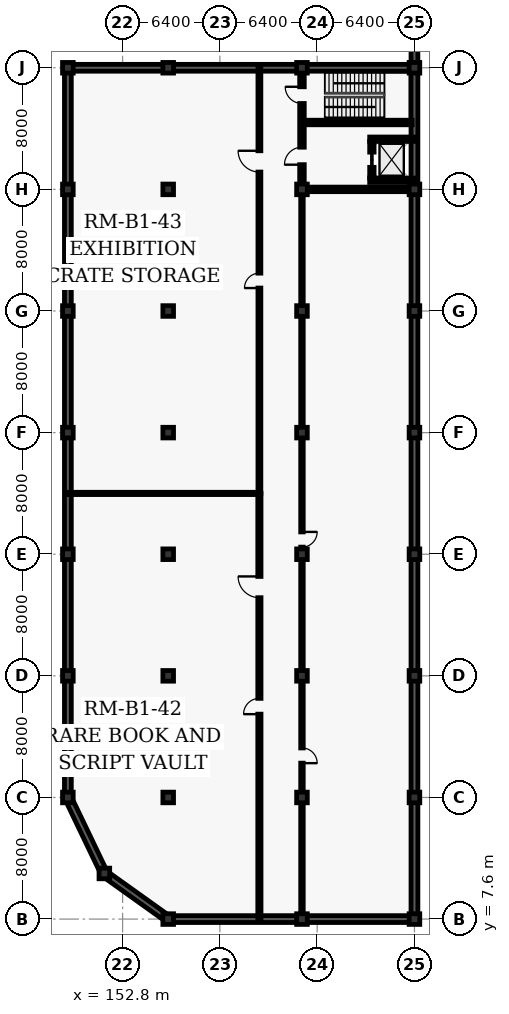
"""IFC4 building model, lengths in metres.
Left out: names, types, materials, properties, quantities, classifications, styles, units other than length and angle.
Written with IfcOpenShell. Run it as: python <this file> out.ifc"""

import sys

from ifc_helpers import new_model, si_unit, direction, frame, frame_2d, origin, origin_2d, place, context, subcontext, project, spatial, rectangle, extrude, element, fill, save


model = new_model("IFC4")
c1 = context("Model", 3, precision=1e-05, world=origin(), true_north=direction((0.0, 1.0)))
c2 = subcontext(c1, "Body", "Model", "MODEL_VIEW")
j1 = project(units=[si_unit("LENGTHUNIT", "METRE"), si_unit("PLANEANGLEUNIT", "RADIAN")], contexts=[c1])
p1 = place(None, origin())
s1 = spatial("IfcSite", under=j1, at=p1, CompositionType="ELEMENT")
p2 = place(p1, origin())
s2 = spatial("IfcBuilding", under=s1, at=p2, CompositionType="ELEMENT")
p3 = place(p2, frame((0.0, 0.0, -4.8)))
s3 = spatial("IfcBuildingStorey", under=s2, at=p3, CompositionType="ELEMENT", Elevation=-4.8)
for number, where, z_axis, x_axis in (
    (1, (149.2, 15.6, 0.0), (0.0, 0.0, 1.0), (1.0, 0.0, 0.0)),
    (2, (149.2, 23.6, 0.0), (0.0, 0.0, 1.0), (1.0, 0.0, 0.0)),
    (3, (149.2, 31.6, 0.0), (0.0, 0.0, 1.0), (1.0, 0.0, 0.0)),
    (4, (149.2, 39.6, 0.0), (0.0, 0.0, 1.0), (1.0, 0.0, 0.0)),
    (5, (149.2, 47.6, 0.0), (0.0, 0.0, 1.0), (1.0, 0.0, 0.0)),
    (6, (149.2, 55.6, 0.0), (0.0, 0.0, 1.0), (1.0, 0.0, 0.0)),
    (7, (149.2, 63.6, 0.0), (0.0, 0.0, 1.0), (1.0, 0.0, 0.0)),
    (8, (151.6, 10.6, 0.0), (0.0, 0.0, 1.0), (1.0, 0.0, 0.0)),
    (9, (155.8, 7.6, 0.0), (0.0, 0.0, 1.0), (1.0, 0.0, 0.0)),
    (10, (155.8, 15.6, 0.0), (0.0, 0.0, 1.0), (1.0, 0.0, 0.0)),
    (11, (155.8, 23.6, 0.0), (0.0, 0.0, 1.0), (1.0, 0.0, 0.0)),
    (12, (155.8, 31.6, 0.0), (0.0, 0.0, 1.0), (1.0, 0.0, 0.0)),
    (13, (155.8, 39.6, 0.0), (0.0, 0.0, 1.0), (1.0, 0.0, 0.0)),
    (14, (155.8, 47.6, 0.0), (0.0, 0.0, 1.0), (1.0, 0.0, 0.0)),
    (15, (155.8, 55.6, 0.0), (0.0, 0.0, 1.0), (1.0, 0.0, 0.0)),
    (16, (155.8, 63.6, 0.0), (0.0, 0.0, 1.0), (1.0, 0.0, 0.0)),
    (17, (164.6, 7.6, 0.0), (0.0, 0.0, 1.0), (1.0, 0.0, 0.0)),
    (18, (164.6, 15.6, 0.0), (0.0, 0.0, 1.0), (1.0, 0.0, 0.0)),
    (19, (164.6, 23.6, 0.0), (0.0, 0.0, 1.0), (1.0, 0.0, 0.0)),
    (20, (164.6, 31.6, 0.0), (0.0, 0.0, 1.0), (1.0, 0.0, 0.0)),
    (21, (164.6, 39.6, 0.0), (0.0, 0.0, 1.0), (1.0, 0.0, 0.0)),
    (22, (164.6, 47.6, 0.0), (0.0, 0.0, 1.0), (1.0, 0.0, 0.0)),
    (23, (164.6, 55.6, 0.0), (0.0, 0.0, 1.0), (1.0, 0.0, 0.0)),
    (24, (164.6, 63.6, 0.0), (0.0, 0.0, 1.0), (1.0, 0.0, 0.0)),
    (25, (172.0, 7.6, 0.0), (0.0, 0.0, 1.0), (1.0, 0.0, 0.0)),
    (26, (172.0, 15.6, 0.0), (0.0, 0.0, 1.0), (1.0, 0.0, 0.0)),
    (27, (172.0, 23.6, 0.0), (0.0, 0.0, 1.0), (1.0, 0.0, 0.0)),
    (28, (172.0, 31.6, 0.0), (0.0, 0.0, 1.0), (1.0, 0.0, 0.0)),
    (29, (172.0, 39.6, 0.0), (0.0, 0.0, 1.0), (1.0, 0.0, 0.0)),
    (30, (172.0, 47.6, 0.0), (0.0, 0.0, 1.0), (1.0, 0.0, 0.0)),
    (31, (172.0, 55.6, 0.0), (0.0, 0.0, 1.0), (1.0, 0.0, 0.0)),
    (32, (172.0, 63.6, 0.0), (0.0, 0.0, 1.0), (1.0, 0.0, 0.0)),
):
    element("IfcColumn", number, at=place(p3, frame(where, z_axis=z_axis, x_axis=x_axis)), inside=s3, PredefinedType="COLUMN", context=c2, shape_type="SweptSolid", body=[
        extrude(rectangle(XDim=0.7, YDim=0.7, at=origin_2d()), origin(), (0.0, 0.0, 1.0), 4.8),
    ])
p4 = place(p3, frame((172.0, 63.62, 0.0), z_axis=(0.0, 0.0, 1.0), x_axis=(0.0, 1.0, 0.0)))
e33 = element("IfcWall", 33, at=p4, inside=s3, PredefinedType="USERDEFINED", context=c2, shape_type="SweptSolid", body=[
    extrude(rectangle(XDim=7.96, YDim=0.45, at=frame_2d((3.98, 0.0))), origin(), (0.0, 0.0, 1.0), 4.53),
])
p5 = place(p3, frame((151.6, 10.6, 0.0), z_axis=(0.0, 0.0, 1.0), x_axis=(-0.432752533251, 0.901512753634, 0.0)))
e34 = element("IfcWall", 34, at=p5, inside=s3, PredefinedType="USERDEFINED", context=c2, shape_type="SweptSolid", body=[
    extrude(rectangle(XDim=5.546, YDim=0.45, at=frame_2d((2.773, 0.0))), origin(), (0.0, 0.0, 1.0), 4.5),
])
p6 = place(p3, frame((149.2, 15.6, 0.0), z_axis=(0.0, 0.0, 1.0), x_axis=(0.0, 1.0, 0.0)))
e35 = element("IfcWall", 35, at=p6, inside=s3, PredefinedType="USERDEFINED", context=c2, shape_type="SweptSolid", body=[
    extrude(rectangle(XDim=48.0, YDim=0.45, at=frame_2d((24.0, 0.0))), origin(), (0.0, 0.0, 1.0), 3.65),
])
p7 = place(p3, frame((149.2, 63.6, 0.0), z_axis=(0.0, 0.0, 1.0), x_axis=(1.0, 0.0, 0.0)))
e36 = element("IfcWall", 36, at=p7, inside=s3, PredefinedType="USERDEFINED", context=c2, shape_type="SweptSolid", body=[
    extrude(rectangle(XDim=22.8, YDim=0.45, at=frame_2d((11.4, 0.0))), origin(), (0.0, 0.0, 1.0), 3.65),
])
p8 = place(p3, frame((172.0, 63.6, 0.0), z_axis=(0.0, 0.0, 1.0), x_axis=(0.0, -1.0, 0.0)))
e37 = element("IfcWall", 37, at=p8, inside=s3, PredefinedType="USERDEFINED", context=c2, shape_type="SweptSolid", body=[
    extrude(rectangle(XDim=56.0, YDim=0.45, at=frame_2d((28.0, 0.0))), origin(), (0.0, 0.0, 1.0), 3.65),
])
p9 = place(p3, frame((172.0, 7.6, 0.0), z_axis=(0.0, 0.0, 1.0), x_axis=(-1.0, 0.0, 0.0)))
e38 = element("IfcWall", 38, at=p9, inside=s3, PredefinedType="USERDEFINED", context=c2, shape_type="SweptSolid", body=[
    extrude(rectangle(XDim=16.2, YDim=0.45, at=frame_2d((8.1, 0.0))), origin(), (0.0, 0.0, 1.0), 3.65),
])
p10 = place(p3, frame((155.8, 7.6, 0.0), z_axis=(0.0, 0.0, 1.0), x_axis=(-0.813730275137, 0.581242668191, 0.0)))
e39 = element("IfcWall", 39, at=p10, inside=s3, PredefinedType="USERDEFINED", context=c2, shape_type="SweptSolid", body=[
    extrude(rectangle(XDim=5.161, YDim=0.45, at=frame_2d((2.581, 0.0))), origin(), (0.0, 0.0, 1.0), 4.5),
])
p11 = place(p3, frame((164.952, 55.6, 0.0), z_axis=(0.0, 0.0, 1.0), x_axis=(1.0, 0.0, 0.0)))
e40 = element("IfcWall", 40, at=p11, inside=s3, PredefinedType="SHEAR", context=c2, shape_type="SweptSolid", body=[
    extrude(rectangle(XDim=6.696, YDim=0.3, at=frame_2d((3.348, 0.0))), origin(), (0.0, 0.0, 1.0), 4.5),
])
p12 = place(p3, frame((164.6, 55.952, 0.0), z_axis=(0.0, 0.0, 1.0), x_axis=(0.0, 1.0, 0.0)))
e41 = element("IfcWall", 41, at=p12, inside=s3, PredefinedType="SHEAR", context=c2, shape_type="SweptSolid", body=[
    extrude(rectangle(XDim=7.296, YDim=0.3, at=frame_2d((3.648, 0.0))), origin(), (0.0, 0.0, 1.0), 4.5),
])
p13 = place(p12, frame((5.298, 0.0, 0.0)))
e42 = element("IfcOpeningElement", 42, at=p13, cuts=e41, PredefinedType="OPENING", context=c2, shape_type="SweptSolid", body=[
    extrude(rectangle(XDim=1.1, YDim=2.15, at=frame_2d((0.55, 1.075))), frame((0.0, 0.16, 0.0), z_axis=(0.0, -1.0, 0.0), x_axis=(1.0, 0.0, 0.0)), (0.0, 0.0, 1.0), 0.32),
])
p14 = place(p12, frame((1.273, 0.0, 0.0)))
e43 = element("IfcOpeningElement", 43, at=p14, cuts=e41, PredefinedType="OPENING", context=c2, shape_type="SweptSolid", body=[
    extrude(rectangle(XDim=1.15, YDim=2.2, at=frame_2d((0.575, 1.1))), frame((0.0, 0.16, 0.0), z_axis=(0.0, -1.0, 0.0), x_axis=(1.0, 0.0, 0.0)), (0.0, 0.0, 1.0), 0.32),
])
p15 = place(p3, frame((164.75, 60.0, 0.0), z_axis=(0.0, 0.0, 1.0), x_axis=(1.0, 0.0, 0.0)))
e44 = element("IfcWall", 44, at=p15, inside=s3, PredefinedType="SHEAR", context=c2, shape_type="SweptSolid", body=[
    extrude(rectangle(XDim=7.1, YDim=0.3, at=frame_2d((3.55, 0.0))), origin(), (0.0, 0.0, 1.0), 4.5),
])
for number, where, z_axis, x_axis in (
    (45, (169.055, 56.2, 0.0), (0.0, 0.0, 1.0), (1.0, 0.0, 0.0)),
    (46, (169.055, 58.9, 0.0), (0.0, 0.0, 1.0), (1.0, 0.0, 0.0)),
):
    element("IfcWall", number, at=place(p3, frame(where, z_axis=z_axis, x_axis=x_axis)), inside=s3, PredefinedType="SHEAR", context=c2, shape_type="SweptSolid", body=[
        extrude(rectangle(XDim=2.89, YDim=0.29, at=frame_2d((1.445, 0.0))), origin(), (0.0, 0.0, 1.0), 4.5),
    ])
p16 = place(p3, frame((169.2, 56.345, 0.0), z_axis=(0.0, 0.0, 1.0), x_axis=(0.0, 1.0, 0.0)))
e47 = element("IfcWall", 47, at=p16, inside=s3, PredefinedType="SHEAR", context=c2, shape_type="SweptSolid", body=[
    extrude(rectangle(XDim=2.41, YDim=0.29, at=frame_2d((1.205, 0.0))), origin(), (0.0, 0.0, 1.0), 4.5),
])
p17 = place(p16, frame((0.705, 0.0, 0.0)))
e48 = element("IfcOpeningElement", 48, at=p17, cuts=e47, PredefinedType="OPENING", context=c2, shape_type="SweptSolid", body=[
    extrude(rectangle(XDim=1.0, YDim=2.15, at=frame_2d((0.5, 1.075))), frame((0.0, 0.155, 0.0), z_axis=(0.0, -1.0, 0.0), x_axis=(1.0, 0.0, 0.0)), (0.0, 0.0, 1.0), 0.31),
])
p18 = place(p3, frame((161.8, 7.6, 0.0), z_axis=(0.0, 0.0, 1.0), x_axis=(0.0, 1.0, 0.0)))
e49 = element("IfcWall", 49, at=p18, inside=s3, PredefinedType="PARTITIONING", context=c2, shape_type="SweptSolid", body=[
    extrude(rectangle(XDim=28.0, YDim=0.21, at=frame_2d((14.0, 0.0))), origin(), (0.0, 0.0, 1.0), 4.5),
])
p19 = place(p18, frame((13.48, 0.0, 0.0)))
e50 = element("IfcOpeningElement", 50, at=p19, cuts=e49, PredefinedType="OPENING", context=c2, shape_type="SweptSolid", body=[
    extrude(rectangle(XDim=1.04, YDim=2.2, at=frame_2d((0.52, 1.1))), frame((0.0, 0.115, 0.0), z_axis=(0.0, -1.0, 0.0), x_axis=(1.0, 0.0, 0.0)), (0.0, 0.0, 1.0), 0.23),
])
p20 = place(p18, frame((21.14, 0.0, 0.0)))
e51 = element("IfcOpeningElement", 51, at=p20, cuts=e49, PredefinedType="OPENING", context=c2, shape_type="SweptSolid", body=[
    extrude(rectangle(XDim=1.4, YDim=2.25, at=frame_2d((0.7, 1.125))), frame((0.0, 0.115, 0.0), z_axis=(0.0, -1.0, 0.0), x_axis=(1.0, 0.0, 0.0)), (0.0, 0.0, 1.0), 0.23),
])
p21 = place(p3, frame((161.8, 35.6, 0.0), z_axis=(0.0, 0.0, 1.0), x_axis=(0.0, 1.0, 0.0)))
e52 = element("IfcWall", 52, at=p21, inside=s3, PredefinedType="PARTITIONING", context=c2, shape_type="SweptSolid", body=[
    extrude(rectangle(XDim=28.0, YDim=0.19, at=frame_2d((14.0, 0.0))), origin(), (0.0, 0.0, 1.0), 4.5),
])
p22 = place(p21, frame((13.51, 0.0, 0.0)))
e53 = element("IfcOpeningElement", 53, at=p22, cuts=e52, PredefinedType="OPENING", context=c2, shape_type="SweptSolid", body=[
    extrude(rectangle(XDim=0.98, YDim=2.1, at=frame_2d((0.49, 1.05))), frame((0.0, 0.105, 0.0), z_axis=(0.0, -1.0, 0.0), x_axis=(1.0, 0.0, 0.0)), (0.0, 0.0, 1.0), 0.21),
])
p23 = place(p21, frame((21.14, 0.0, 0.0)))
e54 = element("IfcOpeningElement", 54, at=p23, cuts=e52, PredefinedType="OPENING", context=c2, shape_type="SweptSolid", body=[
    extrude(rectangle(XDim=1.4, YDim=2.25, at=frame_2d((0.7, 1.125))), frame((0.0, 0.105, 0.0), z_axis=(0.0, -1.0, 0.0), x_axis=(1.0, 0.0, 0.0)), (0.0, 0.0, 1.0), 0.21),
])
p24 = place(p3, frame((164.6, 55.248, 0.0), z_axis=(0.0, 0.0, 1.0), x_axis=(0.0, -1.0, 0.0)))
e55 = element("IfcWall", 55, at=p24, inside=s3, PredefinedType="PARTITIONING", context=c2, shape_type="SweptSolid", body=[
    extrude(rectangle(XDim=47.296, YDim=0.165, at=frame_2d((23.648, 0.0))), origin(), (0.0, 0.0, 1.0), 3.65),
])
p25 = place(p24, frame((22.18, 0.0, 0.0)))
e56 = element("IfcOpeningElement", 56, at=p25, cuts=e55, PredefinedType="OPENING", context=c2, shape_type="SweptSolid", body=[
    extrude(rectangle(XDim=1.0, YDim=2.1, at=frame_2d((0.5, 1.05))), frame((0.0, 0.093, 0.0), z_axis=(0.0, -1.0, 0.0), x_axis=(1.0, 0.0, 0.0)), (0.0, 0.0, 1.0), 0.185),
])
p26 = place(p24, frame((36.391, 0.0, 0.0)))
e57 = element("IfcOpeningElement", 57, at=p26, cuts=e55, PredefinedType="OPENING", context=c2, shape_type="SweptSolid", body=[
    extrude(rectangle(XDim=1.0, YDim=2.1, at=frame_2d((0.5, 1.05))), frame((0.0, 0.093, 0.0), z_axis=(0.0, -1.0, 0.0), x_axis=(1.0, 0.0, 0.0)), (0.0, 0.0, 1.0), 0.185),
])
p27 = place(p3, frame((149.2, 35.6, 0.0), z_axis=(0.0, 0.0, 1.0), x_axis=(1.0, 0.0, 0.0)))
e58 = element("IfcWall", 58, at=p27, inside=s3, PredefinedType="PARTITIONING", context=c2, shape_type="SweptSolid", body=[
    extrude(rectangle(XDim=12.6, YDim=0.15, at=frame_2d((6.3, 0.0))), origin(), (0.0, 0.0, 1.0), 3.95),
])
p28 = place(p13, origin())
e59 = element("IfcDoor", 59, at=p28, inside=s3, OperationType="SINGLE_SWING_RIGHT", PredefinedType="DOOR", context=c2, shape_type="SweptSolid", body=[
    extrude(rectangle(XDim=1.1, YDim=2.15, at=frame_2d((0.55, 1.075))), frame((0.0, 0.025, 0.0), z_axis=(0.0, -1.0, 0.0), x_axis=(1.0, 0.0, 0.0)), (0.0, 0.0, 1.0), 0.05),
])
fill(e42, e59)
p29 = place(p14, origin())
e60 = element("IfcDoor", 60, at=p29, inside=s3, OperationType="SINGLE_SWING_LEFT", PredefinedType="DOOR", context=c2, shape_type="SweptSolid", body=[
    extrude(rectangle(XDim=1.15, YDim=2.2, at=frame_2d((0.575, 1.1))), frame((0.0, 0.025, 0.0), z_axis=(0.0, -1.0, 0.0), x_axis=(1.0, 0.0, 0.0)), (0.0, 0.0, 1.0), 0.05),
])
fill(e43, e60)
p30 = place(p17, origin())
e61 = element("IfcDoor", 61, at=p30, inside=s3, OperationType="SLIDING_TO_LEFT", PredefinedType="DOOR", context=c2, shape_type="SweptSolid", body=[
    extrude(rectangle(XDim=1.0, YDim=2.15, at=frame_2d((0.5, 1.075))), frame((0.0, 0.025, 0.0), z_axis=(0.0, -1.0, 0.0), x_axis=(1.0, 0.0, 0.0)), (0.0, 0.0, 1.0), 0.05),
])
fill(e48, e61)
p31 = place(p19, origin())
e62 = element("IfcDoor", 62, at=p31, inside=s3, OperationType="SINGLE_SWING_LEFT", PredefinedType="DOOR", context=c2, shape_type="SweptSolid", body=[
    extrude(rectangle(XDim=1.04, YDim=2.2, at=frame_2d((0.52, 1.1))), frame((0.0, 0.025, 0.0), z_axis=(0.0, -1.0, 0.0), x_axis=(1.0, 0.0, 0.0)), (0.0, 0.0, 1.0), 0.05),
])
fill(e50, e62)
p32 = place(p20, origin())
e63 = element("IfcDoor", 63, at=p32, inside=s3, OperationType="SINGLE_SWING_RIGHT", PredefinedType="DOOR", context=c2, shape_type="SweptSolid", body=[
    extrude(rectangle(XDim=1.4, YDim=2.25, at=frame_2d((0.7, 1.125))), frame((0.0, 0.025, 0.0), z_axis=(0.0, -1.0, 0.0), x_axis=(1.0, 0.0, 0.0)), (0.0, 0.0, 1.0), 0.05),
])
fill(e51, e63)
p33 = place(p22, origin())
e64 = element("IfcDoor", 64, at=p33, inside=s3, OperationType="SINGLE_SWING_LEFT", PredefinedType="DOOR", context=c2, shape_type="SweptSolid", body=[
    extrude(rectangle(XDim=0.98, YDim=2.1, at=frame_2d((0.49, 1.05))), frame((0.0, 0.025, 0.0), z_axis=(0.0, -1.0, 0.0), x_axis=(1.0, 0.0, 0.0)), (0.0, 0.0, 1.0), 0.05),
])
fill(e53, e64)
p34 = place(p23, origin())
e65 = element("IfcDoor", 65, at=p34, inside=s3, OperationType="SINGLE_SWING_RIGHT", PredefinedType="DOOR", context=c2, shape_type="SweptSolid", body=[
    extrude(rectangle(XDim=1.4, YDim=2.25, at=frame_2d((0.7, 1.125))), frame((0.0, 0.025, 0.0), z_axis=(0.0, -1.0, 0.0), x_axis=(1.0, 0.0, 0.0)), (0.0, 0.0, 1.0), 0.05),
])
fill(e54, e65)
p35 = place(p25, origin())
e66 = element("IfcDoor", 66, at=p35, inside=s3, OperationType="SINGLE_SWING_LEFT", PredefinedType="DOOR", context=c2, shape_type="SweptSolid", body=[
    extrude(rectangle(XDim=1.0, YDim=2.1, at=frame_2d((0.5, 1.05))), frame((0.0, 0.025, 0.0), z_axis=(0.0, -1.0, 0.0), x_axis=(1.0, 0.0, 0.0)), (0.0, 0.0, 1.0), 0.05),
])
fill(e56, e66)
p36 = place(p26, origin())
e67 = element("IfcDoor", 67, at=p36, inside=s3, OperationType="SINGLE_SWING_RIGHT", PredefinedType="DOOR", context=c2, shape_type="SweptSolid", body=[
    extrude(rectangle(XDim=1.0, YDim=2.1, at=frame_2d((0.5, 1.05))), frame((0.0, 0.025, 0.0), z_axis=(0.0, -1.0, 0.0), x_axis=(1.0, 0.0, 0.0)), (0.0, 0.0, 1.0), 0.05),
])
fill(e57, e67)
save(model, sys.argv[1])
